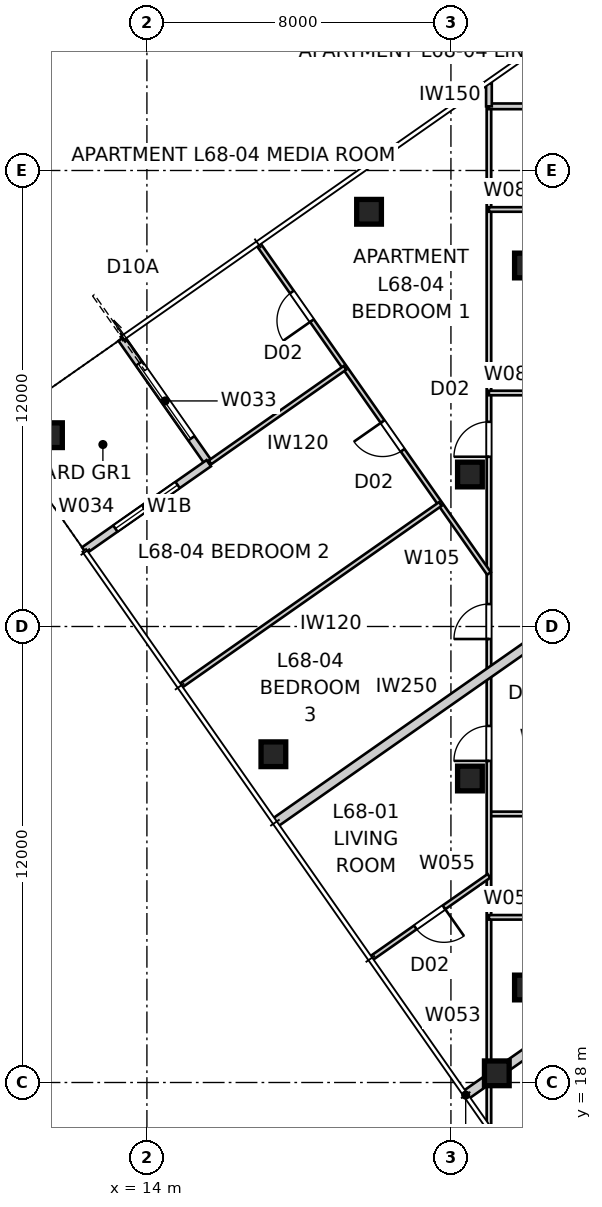
"""IFC4 building model, lengths in metres.
Left out: names, types, materials, properties, quantities, classifications, styles, units other than length and angle.
Written with IfcOpenShell. Run it as: python <this file> out.ifc"""

import sys

from ifc_helpers import new_model, si_unit, direction, frame, frame_2d, origin, origin_2d, place, context, subcontext, project, spatial, rectangle, extrude, element, fill, save


model = new_model("IFC4")
c1 = context("Model", 3, precision=1e-05, world=origin(), true_north=direction((0.0, 1.0)))
c2 = subcontext(c1, "Body", "Model", "MODEL_VIEW")
j1 = project(units=[si_unit("LENGTHUNIT", "METRE"), si_unit("PLANEANGLEUNIT", "RADIAN")], contexts=[c1])
p1 = place(None, origin())
s1 = spatial("IfcSite", under=j1, at=p1, CompositionType="ELEMENT")
p2 = place(p1, origin())
s2 = spatial("IfcBuilding", under=s1, at=p2, CompositionType="ELEMENT")
p3 = place(p2, frame((0.0, 0.0, 247.2)))
s3 = spatial("IfcBuildingStorey", under=s2, at=p3, CompositionType="ELEMENT", Elevation=247.2)
for number, where, z_axis, x_axis in (
    (1, (19.845, 40.914, 0.0), (0.0, 0.0, 1.0), (1.0, 0.0, 0.0)),
    (2, (11.449, 35.034, 0.0), (0.0, 0.0, 1.0), (1.0, 0.0, 0.0)),
    (3, (17.328, 26.638, 0.0), (0.0, 0.0, 1.0), (1.0, 0.0, 0.0)),
    (4, (23.207, 18.242, 0.0), (0.0, 0.0, 1.0), (1.0, 0.0, 0.0)),
    (5, (24.0, 39.5, 0.0), (0.0, 0.0, 1.0), (1.0, 0.0, 0.0)),
    (6, (22.5, 34.0, 0.0), (0.0, 0.0, 1.0), (1.0, 0.0, 0.0)),
    (7, (22.5, 26.0, 0.0), (0.0, 0.0, 1.0), (1.0, 0.0, 0.0)),
    (8, (24.0, 20.5, 0.0), (0.0, 0.0, 1.0), (1.0, 0.0, 0.0)),
):
    element("IfcColumn", number, at=place(p3, frame(where, z_axis=z_axis, x_axis=x_axis)), inside=s3, PredefinedType="COLUMN", context=c2, shape_type="SweptSolid", body=[
        extrude(rectangle(XDim=0.65, YDim=0.65, at=origin_2d()), origin(), (0.0, 0.0, 1.0), 3.4),
    ])
p4 = place(p3, frame((13.333, 37.574, 0.0), z_axis=(0.0, 0.0, 1.0), x_axis=(0.573556557423, -0.819165963305, 0.0)))
e9 = element("IfcWall", 9, at=p4, inside=s3, PredefinedType="SOLIDWALL", context=c2, shape_type="SweptSolid", body=[
    extrude(rectangle(XDim=4.0, YDim=0.2, at=frame_2d((2.0, 0.0))), origin(), (0.0, 0.0, 1.0), 3.25),
])
p5 = place(p4, frame((0.8, 0.0, 0.0)))
e10 = element("IfcOpeningElement", 10, at=p5, cuts=e9, PredefinedType="OPENING", context=c2, shape_type="SweptSolid", body=[
    extrude(rectangle(XDim=2.4, YDim=2.1, at=frame_2d((1.2, 1.05))), frame((0.0, 0.11, 0.0), z_axis=(0.0, -1.0, 0.0), x_axis=(1.0, 0.0, 0.0)), (0.0, 0.0, 1.0), 0.22),
])
p6 = place(p3, frame((15.627, 34.298, 0.0), z_axis=(0.0, 0.0, 1.0), x_axis=(-0.819137286189, -0.573597512525, 0.0)))
e11 = element("IfcWall", 11, at=p6, inside=s3, PredefinedType="SOLIDWALL", context=c2, shape_type="SweptSolid", body=[
    extrude(rectangle(XDim=4.0, YDim=0.2, at=frame_2d((2.0, 0.0))), origin(), (0.0, 0.0, 1.0), 3.25),
])
p7 = place(p6, frame((1.0, 0.0, 0.45)))
e12 = element("IfcOpeningElement", 12, at=p7, cuts=e11, PredefinedType="OPENING", context=c2, shape_type="SweptSolid", body=[
    extrude(rectangle(XDim=2.0, YDim=1.8, at=frame_2d((1.0, 0.9))), frame((0.0, 0.11, 0.0), z_axis=(0.0, -1.0, 0.0), x_axis=(1.0, 0.0, 0.0)), (0.0, 0.0, 1.0), 0.22),
])
p8 = place(p3, frame((22.388, 17.668, 0.0), z_axis=(0.0, 0.0, 1.0), x_axis=(0.819161528122, 0.573562891796, 0.0)))
e13 = element("IfcWall", 13, at=p8, inside=s3, PredefinedType="PARTITIONING", context=c2, shape_type="SweptSolid", body=[
    extrude(rectangle(XDim=6.681, YDim=0.25, at=frame_2d((3.341, 0.0))), origin(), (0.0, 0.0, 1.0), 3.25),
])
p9 = place(p3, frame((17.369, 24.836, 0.0), z_axis=(0.0, 0.0, 1.0), x_axis=(0.81915902312, 0.573566469418, 0.0)))
e14 = element("IfcWall", 14, at=p9, inside=s3, PredefinedType="PARTITIONING", context=c2, shape_type="SweptSolid", body=[
    extrude(rectangle(XDim=9.756, YDim=0.25, at=frame_2d((4.878, 0.0))), origin(), (0.0, 0.0, 1.0), 3.25),
])
p10 = place(p3, frame((27.9, 25.068, 0.0), z_axis=(0.0, 0.0, 1.0), x_axis=(-1.0, 0.0, 0.0)))
e15 = element("IfcWall", 15, at=p10, inside=s3, PredefinedType="PARTITIONING", context=c2, shape_type="SweptSolid", body=[
    extrude(rectangle(XDim=4.9, YDim=0.12, at=frame_2d((2.45, 0.0))), origin(), (0.0, 0.0, 1.0), 3.25),
])
p11 = place(p10, frame((2.59, 0.0, 0.0)))
e16 = element("IfcOpeningElement", 16, at=p11, cuts=e15, PredefinedType="OPENING", context=c2, shape_type="SweptSolid", body=[
    extrude(rectangle(XDim=0.92, YDim=2.34, at=frame_2d((0.46, 1.17))), frame((0.0, 0.07, 0.0), z_axis=(0.0, -1.0, 0.0), x_axis=(1.0, 0.0, 0.0)), (0.0, 0.0, 1.0), 0.14),
])
p12 = place(p3, frame((23.0, 16.864, 0.0), z_axis=(0.0, 0.0, 1.0), x_axis=(0.0, 1.0, 0.0)))
e17 = element("IfcWall", 17, at=p12, inside=s3, PredefinedType="PARTITIONING", context=c2, shape_type="SweptSolid", body=[
    extrude(rectangle(XDim=26.824, YDim=0.12, at=frame_2d((13.412, 0.0))), origin(), (0.0, 0.0, 1.0), 2.55),
])
p13 = place(p12, frame((9.599, 0.0, 0.0)))
e18 = element("IfcOpeningElement", 18, at=p13, cuts=e17, PredefinedType="OPENING", context=c2, shape_type="SweptSolid", body=[
    extrude(rectangle(XDim=0.92, YDim=2.34, at=frame_2d((0.46, 1.17))), frame((0.0, 0.07, 0.0), z_axis=(0.0, -1.0, 0.0), x_axis=(1.0, 0.0, 0.0)), (0.0, 0.0, 1.0), 0.14),
])
p14 = place(p12, frame((17.603, 0.0, 0.0)))
e19 = element("IfcOpeningElement", 19, at=p14, cuts=e17, PredefinedType="OPENING", context=c2, shape_type="SweptSolid", body=[
    extrude(rectangle(XDim=0.92, YDim=2.34, at=frame_2d((0.46, 1.17))), frame((0.0, 0.07, 0.0), z_axis=(0.0, -1.0, 0.0), x_axis=(1.0, 0.0, 0.0)), (0.0, 0.0, 1.0), 0.14),
])
p15 = place(p12, frame((12.806, 0.0, 0.0)))
e20 = element("IfcOpeningElement", 20, at=p15, cuts=e17, PredefinedType="OPENING", context=c2, shape_type="SweptSolid", body=[
    extrude(rectangle(XDim=0.92, YDim=2.34, at=frame_2d((0.46, 1.17))), frame((0.0, 0.07, 0.0), z_axis=(0.0, -1.0, 0.0), x_axis=(1.0, 0.0, 0.0)), (0.0, 0.0, 1.0), 0.14),
])
p16 = place(p3, frame((23.0, 22.347, 0.0), z_axis=(0.0, 0.0, 1.0), x_axis=(1.0, 0.0, 0.0)))
e21 = element("IfcWall", 21, at=p16, inside=s3, PredefinedType="PARTITIONING", context=c2, shape_type="SweptSolid", body=[
    extrude(rectangle(XDim=4.9, YDim=0.12, at=frame_2d((2.45, 0.0))), origin(), (0.0, 0.0, 1.0), 3.25),
])
p17 = place(p16, frame((1.97, 0.0, 0.0)))
e22 = element("IfcOpeningElement", 22, at=p17, cuts=e21, PredefinedType="OPENING", context=c2, shape_type="SweptSolid", body=[
    extrude(rectangle(XDim=0.96, YDim=2.1, at=frame_2d((0.48, 1.05))), frame((0.0, 0.07, 0.0), z_axis=(0.0, -1.0, 0.0), x_axis=(1.0, 0.0, 0.0)), (0.0, 0.0, 1.0), 0.14),
])
p18 = place(p3, frame((23.0, 23.438, 0.0), z_axis=(0.0, 0.0, 1.0), x_axis=(-0.819140645834, -0.573592714688, 0.0)))
e23 = element("IfcWall", 23, at=p18, inside=s3, PredefinedType="PARTITIONING", context=c2, shape_type="SweptSolid", body=[
    extrude(rectangle(XDim=3.77, YDim=0.12, at=frame_2d((1.885, 0.0))), origin(), (0.0, 0.0, 1.0), 3.25),
])
p19 = place(p18, frame((1.445, 0.0, 0.0)))
e24 = element("IfcOpeningElement", 24, at=p19, cuts=e23, PredefinedType="OPENING", context=c2, shape_type="SweptSolid", body=[
    extrude(rectangle(XDim=0.92, YDim=2.34, at=frame_2d((0.46, 1.17))), frame((0.0, 0.07, 0.0), z_axis=(0.0, -1.0, 0.0), x_axis=(1.0, 0.0, 0.0)), (0.0, 0.0, 1.0), 0.14),
])
p20 = place(p3, frame((23.0, 36.145, 0.0), z_axis=(0.0, 0.0, 1.0), x_axis=(1.0, 0.0, 0.0)))
e25 = element("IfcWall", 25, at=p20, inside=s3, PredefinedType="PARTITIONING", context=c2, shape_type="SweptSolid", body=[
    extrude(rectangle(XDim=4.9, YDim=0.12, at=frame_2d((2.45, 0.0))), origin(), (0.0, 0.0, 1.0), 3.25),
])
p21 = place(p20, frame((1.99, 0.0, 0.0)))
e26 = element("IfcOpeningElement", 26, at=p21, cuts=e25, PredefinedType="OPENING", context=c2, shape_type="SweptSolid", body=[
    extrude(rectangle(XDim=0.92, YDim=2.34, at=frame_2d((0.46, 1.17))), frame((0.0, 0.07, 0.0), z_axis=(0.0, -1.0, 0.0), x_axis=(1.0, 0.0, 0.0)), (0.0, 0.0, 1.0), 0.14),
])
p22 = place(p3, frame((23.0, 40.974, 0.0), z_axis=(0.0, 0.0, 1.0), x_axis=(1.0, 0.0, 0.0)))
e27 = element("IfcWall", 27, at=p22, inside=s3, PredefinedType="PARTITIONING", context=c2, shape_type="SweptSolid", body=[
    extrude(rectangle(XDim=4.9, YDim=0.12, at=frame_2d((2.45, 0.0))), origin(), (0.0, 0.0, 1.0), 3.25),
])
p23 = place(p22, frame((1.97, 0.0, 0.0)))
e28 = element("IfcOpeningElement", 28, at=p23, cuts=e27, PredefinedType="OPENING", context=c2, shape_type="SweptSolid", body=[
    extrude(rectangle(XDim=0.96, YDim=2.1, at=frame_2d((0.48, 1.05))), frame((0.0, 0.07, 0.0), z_axis=(0.0, -1.0, 0.0), x_axis=(1.0, 0.0, 0.0)), (0.0, 0.0, 1.0), 0.14),
])
p24 = place(p3, frame((23.0, 43.688, 0.0), z_axis=(0.0, 0.0, 1.0), x_axis=(1.0, 0.0, 0.0)))
e29 = element("IfcWall", 29, at=p24, inside=s3, PredefinedType="SOLIDWALL", context=c2, shape_type="SweptSolid", body=[
    extrude(rectangle(XDim=5.708, YDim=0.15, at=frame_2d((2.854, 0.0))), origin(), (0.0, 0.0, 1.0), 3.25),
])
p25 = place(p24, frame((2.374, 0.0, 0.0)))
e30 = element("IfcOpeningElement", 30, at=p25, cuts=e29, PredefinedType="OPENING", context=c2, shape_type="SweptSolid", body=[
    extrude(rectangle(XDim=0.96, YDim=2.1, at=frame_2d((0.48, 1.05))), frame((0.0, 0.085, 0.0), z_axis=(0.0, -1.0, 0.0), x_axis=(1.0, 0.0, 0.0)), (0.0, 0.0, 1.0), 0.17),
])
p26 = place(p3, frame((23.0, 43.688, 0.0), z_axis=(0.0, 0.0, 1.0), x_axis=(0.0, 1.0, 0.0)))
e31 = element("IfcWall", 31, at=p26, inside=s3, PredefinedType="SOLIDWALL", context=c2, shape_type="SweptSolid", body=[
    extrude(rectangle(XDim=0.606, YDim=0.15, at=frame_2d((0.303, 0.0))), origin(), (0.0, 0.0, 1.0), 3.25),
])
p27 = place(p3, frame((23.0, 31.396, 0.0), z_axis=(0.0, 0.0, 1.0), x_axis=(-0.573575545802, 0.819152667857, 0.0)))
e32 = element("IfcWall", 32, at=p27, inside=s3, PredefinedType="PARTITIONING", context=c2, shape_type="SweptSolid", body=[
    extrude(rectangle(XDim=10.566, YDim=0.12, at=frame_2d((5.283, 0.0))), origin(), (0.0, 0.0, 1.0), 3.25),
])
p28 = place(p27, frame((3.958, 0.0, 0.0)))
e33 = element("IfcOpeningElement", 33, at=p28, cuts=e32, PredefinedType="OPENING", context=c2, shape_type="SweptSolid", body=[
    extrude(rectangle(XDim=0.92, YDim=2.34, at=frame_2d((0.46, 1.17))), frame((0.0, 0.07, 0.0), z_axis=(0.0, -1.0, 0.0), x_axis=(1.0, 0.0, 0.0)), (0.0, 0.0, 1.0), 0.14),
])
p29 = place(p27, frame((8.121, 0.0, 0.0)))
e34 = element("IfcOpeningElement", 34, at=p29, cuts=e32, PredefinedType="OPENING", context=c2, shape_type="SweptSolid", body=[
    extrude(rectangle(XDim=0.92, YDim=2.34, at=frame_2d((0.46, 1.17))), frame((0.0, 0.07, 0.0), z_axis=(0.0, -1.0, 0.0), x_axis=(1.0, 0.0, 0.0)), (0.0, 0.0, 1.0), 0.14),
])
p30 = place(p3, frame((21.72, 33.223, 0.0), z_axis=(0.0, 0.0, 1.0), x_axis=(-0.819152099525, -0.573576357466, 0.0)))
e35 = element("IfcWall", 35, at=p30, inside=s3, PredefinedType="PARTITIONING", context=c2, shape_type="SweptSolid", body=[
    extrude(rectangle(XDim=8.335, YDim=0.12, at=frame_2d((4.167, 0.0))), origin(), (0.0, 0.0, 1.0), 3.25),
])
p31 = place(p3, frame((15.66, 34.321, 0.0), z_axis=(0.0, 0.0, 1.0), x_axis=(0.819165768115, 0.573556836197, 0.0)))
e36 = element("IfcWall", 36, at=p31, inside=s3, PredefinedType="PARTITIONING", context=c2, shape_type="SweptSolid", body=[
    extrude(rectangle(XDim=4.335, YDim=0.12, at=frame_2d((2.167, 0.0))), origin(), (0.0, 0.0, 1.0), 3.25),
])
p32 = place(p5, origin())
e37 = element("IfcDoor", 37, at=p32, inside=s3, OperationType="SLIDING_TO_LEFT", PredefinedType="DOOR", context=c2, shape_type="SweptSolid", body=[
    extrude(rectangle(XDim=2.4, YDim=2.1, at=frame_2d((1.2, 1.05))), frame((0.0, 0.025, 0.0), z_axis=(0.0, -1.0, 0.0), x_axis=(1.0, 0.0, 0.0)), (0.0, 0.0, 1.0), 0.05),
])
fill(e10, e37)
p33 = place(p7, origin())
e38 = element("IfcWindow", 38, at=p33, inside=s3, PartitioningType="SINGLE_PANEL", PredefinedType="WINDOW", context=c2, shape_type="SweptSolid", body=[
    extrude(rectangle(XDim=2.0, YDim=1.8, at=frame_2d((1.0, 0.9))), frame((0.0, 0.03, 0.0), z_axis=(0.0, -1.0, 0.0), x_axis=(1.0, 0.0, 0.0)), (0.0, 0.0, 1.0), 0.06),
])
fill(e12, e38)
p34 = place(p13, origin())
e39 = element("IfcDoor", 39, at=p34, inside=s3, OperationType="SINGLE_SWING_LEFT", PredefinedType="DOOR", context=c2, shape_type="SweptSolid", body=[
    extrude(rectangle(XDim=0.92, YDim=2.34, at=frame_2d((0.46, 1.17))), frame((0.0, 0.025, 0.0), z_axis=(0.0, -1.0, 0.0), x_axis=(1.0, 0.0, 0.0)), (0.0, 0.0, 1.0), 0.05),
])
fill(e18, e39)
p35 = place(p14, origin())
e40 = element("IfcDoor", 40, at=p35, inside=s3, OperationType="SINGLE_SWING_LEFT", PredefinedType="DOOR", context=c2, shape_type="SweptSolid", body=[
    extrude(rectangle(XDim=0.92, YDim=2.34, at=frame_2d((0.46, 1.17))), frame((0.0, 0.025, 0.0), z_axis=(0.0, -1.0, 0.0), x_axis=(1.0, 0.0, 0.0)), (0.0, 0.0, 1.0), 0.05),
])
fill(e19, e40)
p36 = place(p15, origin())
e41 = element("IfcDoor", 41, at=p36, inside=s3, OperationType="SINGLE_SWING_LEFT", PredefinedType="DOOR", context=c2, shape_type="SweptSolid", body=[
    extrude(rectangle(XDim=0.92, YDim=2.34, at=frame_2d((0.46, 1.17))), frame((0.0, 0.025, 0.0), z_axis=(0.0, -1.0, 0.0), x_axis=(1.0, 0.0, 0.0)), (0.0, 0.0, 1.0), 0.05),
])
fill(e20, e41)
p37 = place(p19, origin())
e42 = element("IfcDoor", 42, at=p37, inside=s3, OperationType="SINGLE_SWING_LEFT", PredefinedType="DOOR", context=c2, shape_type="SweptSolid", body=[
    extrude(rectangle(XDim=0.92, YDim=2.34, at=frame_2d((0.46, 1.17))), frame((0.0, 0.025, 0.0), z_axis=(0.0, -1.0, 0.0), x_axis=(1.0, 0.0, 0.0)), (0.0, 0.0, 1.0), 0.05),
])
fill(e24, e42)
p38 = place(p28, origin())
e43 = element("IfcDoor", 43, at=p38, inside=s3, OperationType="SINGLE_SWING_RIGHT", PredefinedType="DOOR", context=c2, shape_type="SweptSolid", body=[
    extrude(rectangle(XDim=0.92, YDim=2.34, at=frame_2d((0.46, 1.17))), frame((0.0, 0.025, 0.0), z_axis=(0.0, -1.0, 0.0), x_axis=(1.0, 0.0, 0.0)), (0.0, 0.0, 1.0), 0.05),
])
fill(e33, e43)
p39 = place(p29, origin())
e44 = element("IfcDoor", 44, at=p39, inside=s3, OperationType="SINGLE_SWING_LEFT", PredefinedType="DOOR", context=c2, shape_type="SweptSolid", body=[
    extrude(rectangle(XDim=0.92, YDim=2.34, at=frame_2d((0.46, 1.17))), frame((0.0, 0.025, 0.0), z_axis=(0.0, -1.0, 0.0), x_axis=(1.0, 0.0, 0.0)), (0.0, 0.0, 1.0), 0.05),
])
fill(e34, e44)
save(model, sys.argv[1])
